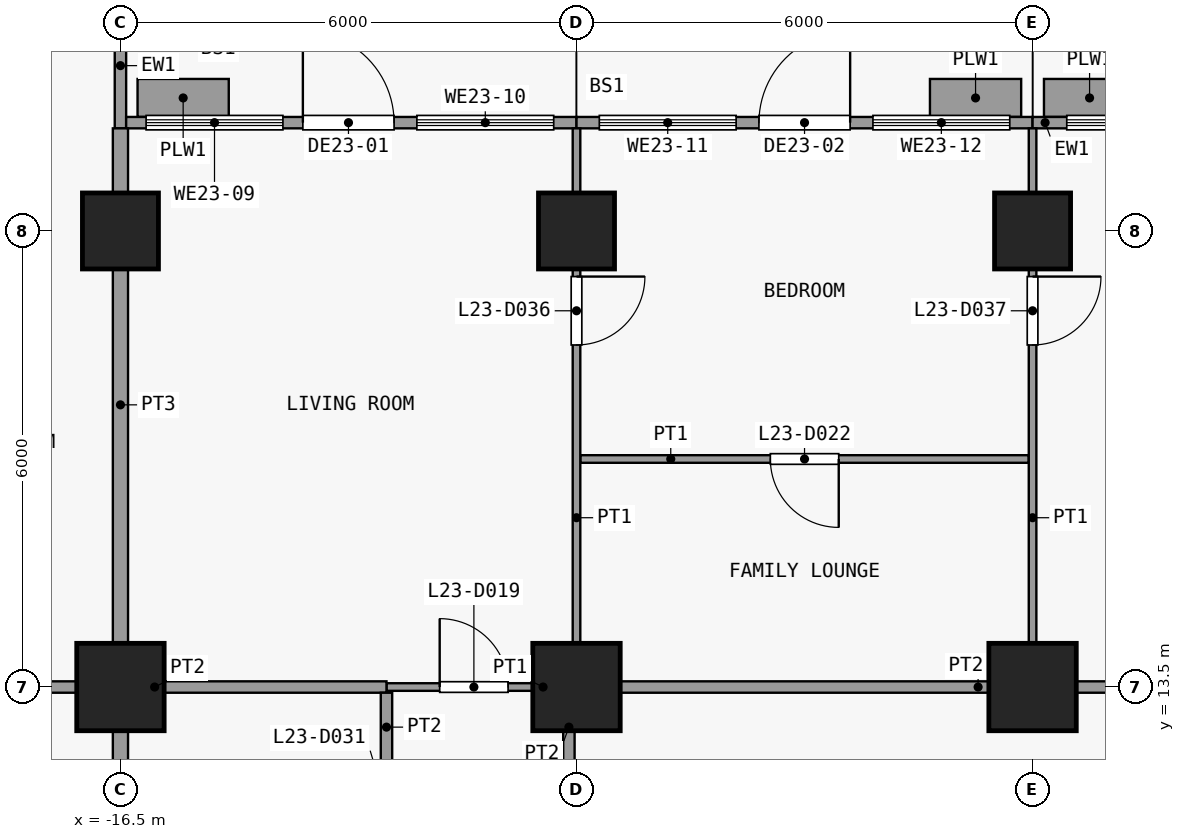
"""IFC4 building model, lengths in metres.
Left out: names, types, materials, properties, quantities, classifications, styles, units other than length and angle.
Written with IfcOpenShell. Run it as: python <this file> out.ifc"""

import sys

from ifc_helpers import new_model, si_unit, direction, frame, frame_2d, origin, origin_2d, place, context, subcontext, project, spatial, rectangle, extrude, element, fill, save


model = new_model("IFC4")
c1 = context("Model", 3, precision=1e-05, world=origin(), true_north=direction((0.0, 1.0)))
c2 = subcontext(c1, "Body", "Model", "MODEL_VIEW")
j1 = project(units=[si_unit("LENGTHUNIT", "METRE"), si_unit("PLANEANGLEUNIT", "RADIAN")], contexts=[c1])
p1 = place(None, origin())
s1 = spatial("IfcSite", under=j1, at=p1, CompositionType="ELEMENT")
p2 = place(p1, origin())
s2 = spatial("IfcBuilding", under=s1, at=p2, CompositionType="ELEMENT")
p3 = place(p2, frame((0.0, 0.0, 95.5)))
s3 = spatial("IfcBuildingStorey", under=s2, at=p3, CompositionType="ELEMENT", Elevation=95.5)
p4 = place(p3, frame((-16.5, 13.5, 0.0), z_axis=(0.0, 0.0, 1.0), x_axis=(1.0, 0.0, 0.0)))
e1 = element("IfcColumn", 1, at=p4, inside=s3, PredefinedType="COLUMN", context=c2, shape_type="SweptSolid", body=[
    extrude(rectangle(XDim=1.15, YDim=1.15, at=origin_2d()), origin(), (0.0, 0.0, 1.0), 3.6),
])
p5 = place(p3, frame((-16.5, 19.5, 0.0), z_axis=(0.0, 0.0, 1.0), x_axis=(1.0, 0.0, 0.0)))
e2 = element("IfcColumn", 2, at=p5, inside=s3, PredefinedType="COLUMN", context=c2, shape_type="SweptSolid", body=[
    extrude(rectangle(XDim=1.0, YDim=1.0, at=origin_2d()), origin(), (0.0, 0.0, 1.0), 3.6),
])
p6 = place(p3, frame((-10.5, 13.5, 0.0), z_axis=(0.0, 0.0, 1.0), x_axis=(1.0, 0.0, 0.0)))
e3 = element("IfcColumn", 3, at=p6, inside=s3, PredefinedType="COLUMN", context=c2, shape_type="SweptSolid", body=[
    extrude(rectangle(XDim=1.15, YDim=1.15, at=origin_2d()), origin(), (0.0, 0.0, 1.0), 3.6),
])
p7 = place(p3, frame((-10.5, 19.5, 0.0), z_axis=(0.0, 0.0, 1.0), x_axis=(1.0, 0.0, 0.0)))
e4 = element("IfcColumn", 4, at=p7, inside=s3, PredefinedType="COLUMN", context=c2, shape_type="SweptSolid", body=[
    extrude(rectangle(XDim=1.0, YDim=1.0, at=origin_2d()), origin(), (0.0, 0.0, 1.0), 3.6),
])
p8 = place(p3, frame((-4.5, 13.5, 0.0), z_axis=(0.0, 0.0, 1.0), x_axis=(1.0, 0.0, 0.0)))
e5 = element("IfcColumn", 5, at=p8, inside=s3, PredefinedType="COLUMN", context=c2, shape_type="SweptSolid", body=[
    extrude(rectangle(XDim=1.15, YDim=1.15, at=origin_2d()), origin(), (0.0, 0.0, 1.0), 3.6),
])
p9 = place(p3, frame((-4.5, 19.5, 0.0), z_axis=(0.0, 0.0, 1.0), x_axis=(1.0, 0.0, 0.0)))
e6 = element("IfcColumn", 6, at=p9, inside=s3, PredefinedType="COLUMN", context=c2, shape_type="SweptSolid", body=[
    extrude(rectangle(XDim=1.0, YDim=1.0, at=origin_2d()), origin(), (0.0, 0.0, 1.0), 3.6),
])
p10 = place(p3, frame((-16.5, 20.85, 0.0), z_axis=(0.0, 0.0, 1.0), x_axis=(0.0, 1.0, 0.0)))
e7 = element("IfcWall", 7, at=p10, inside=s3, PredefinedType="SOLIDWALL", context=c2, shape_type="SweptSolid", body=[
    extrude(rectangle(XDim=1.65, YDim=0.15, at=frame_2d((0.825, 0.0))), origin(), (0.0, 0.0, 1.0), 3.3),
])
p11 = place(p3, frame((-16.425, 20.925, 0.0), z_axis=(0.0, 0.0, 1.0), x_axis=(1.0, 0.0, 0.0)))
e8 = element("IfcWall", 8, at=p11, inside=s3, PredefinedType="SOLIDWALL", context=c2, shape_type="SweptSolid", body=[
    extrude(rectangle(XDim=5.925, YDim=0.15, at=frame_2d((2.962, 0.0))), origin(), (0.0, 0.0, 1.0), 3.3),
])
p12 = place(p11, frame((2.325, 0.0, 0.0)))
e9 = element("IfcOpeningElement", 9, at=p12, cuts=e8, PredefinedType="OPENING", context=c2, shape_type="SweptSolid", body=[
    extrude(rectangle(XDim=1.2, YDim=2.4, at=frame_2d((0.6, 1.2))), frame((0.0, 0.085, 0.0), z_axis=(0.0, -1.0, 0.0), x_axis=(1.0, 0.0, 0.0)), (0.0, 0.0, 1.0), 0.17),
])
p13 = place(p11, frame((0.262, 0.0, 0.9)))
e10 = element("IfcOpeningElement", 10, at=p13, cuts=e8, PredefinedType="OPENING", context=c2, shape_type="SweptSolid", body=[
    extrude(rectangle(XDim=1.8, YDim=2.1, at=frame_2d((0.9, 1.05))), frame((0.0, 0.085, 0.0), z_axis=(0.0, -1.0, 0.0), x_axis=(1.0, 0.0, 0.0)), (0.0, 0.0, 1.0), 0.17),
])
p14 = place(p11, frame((3.825, 0.0, 0.9)))
e11 = element("IfcOpeningElement", 11, at=p14, cuts=e8, PredefinedType="OPENING", context=c2, shape_type="SweptSolid", body=[
    extrude(rectangle(XDim=1.8, YDim=2.1, at=frame_2d((0.9, 1.05))), frame((0.0, 0.085, 0.0), z_axis=(0.0, -1.0, 0.0), x_axis=(1.0, 0.0, 0.0)), (0.0, 0.0, 1.0), 0.17),
])
p15 = place(p3, frame((-16.275, 21.25, 0.0), z_axis=(0.0, 0.0, 1.0), x_axis=(1.0, 0.0, 0.0)))
e12 = element("IfcWall", 12, at=p15, inside=s3, PredefinedType="USERDEFINED", context=c2, shape_type="SweptSolid", body=[
    extrude(rectangle(XDim=1.2, YDim=0.5, at=frame_2d((0.6, 0.0))), origin(), (0.0, 0.0, 1.0), 0.9),
])
p16 = place(p3, frame((-10.5, 20.925, 0.0), z_axis=(0.0, 0.0, 1.0), x_axis=(1.0, 0.0, 0.0)))
e13 = element("IfcWall", 13, at=p16, inside=s3, PredefinedType="SOLIDWALL", context=c2, shape_type="SweptSolid", body=[
    extrude(rectangle(XDim=6.0, YDim=0.15, at=frame_2d((3.0, 0.0))), origin(), (0.0, 0.0, 1.0), 3.3),
])
p17 = place(p16, frame((2.4, 0.0, 0.0)))
e14 = element("IfcOpeningElement", 14, at=p17, cuts=e13, PredefinedType="OPENING", context=c2, shape_type="SweptSolid", body=[
    extrude(rectangle(XDim=1.2, YDim=2.4, at=frame_2d((0.6, 1.2))), frame((0.0, 0.085, 0.0), z_axis=(0.0, -1.0, 0.0), x_axis=(1.0, 0.0, 0.0)), (0.0, 0.0, 1.0), 0.17),
])
p18 = place(p16, frame((0.3, 0.0, 0.9)))
e15 = element("IfcOpeningElement", 15, at=p18, cuts=e13, PredefinedType="OPENING", context=c2, shape_type="SweptSolid", body=[
    extrude(rectangle(XDim=1.8, YDim=2.1, at=frame_2d((0.9, 1.05))), frame((0.0, 0.085, 0.0), z_axis=(0.0, -1.0, 0.0), x_axis=(1.0, 0.0, 0.0)), (0.0, 0.0, 1.0), 0.17),
])
p19 = place(p16, frame((3.9, 0.0, 0.9)))
e16 = element("IfcOpeningElement", 16, at=p19, cuts=e13, PredefinedType="OPENING", context=c2, shape_type="SweptSolid", body=[
    extrude(rectangle(XDim=1.8, YDim=2.1, at=frame_2d((0.9, 1.05))), frame((0.0, 0.085, 0.0), z_axis=(0.0, -1.0, 0.0), x_axis=(1.0, 0.0, 0.0)), (0.0, 0.0, 1.0), 0.17),
])
p20 = place(p3, frame((-5.85, 21.25, 0.0), z_axis=(0.0, 0.0, 1.0), x_axis=(1.0, 0.0, 0.0)))
e17 = element("IfcWall", 17, at=p20, inside=s3, PredefinedType="USERDEFINED", context=c2, shape_type="SweptSolid", body=[
    extrude(rectangle(XDim=1.2, YDim=0.5, at=frame_2d((0.6, 0.0))), origin(), (0.0, 0.0, 1.0), 0.9),
])
p21 = place(p3, frame((-4.5, 20.925, 0.0), z_axis=(0.0, 0.0, 1.0), x_axis=(1.0, 0.0, 0.0)))
e18 = element("IfcWall", 18, at=p21, inside=s3, PredefinedType="SOLIDWALL", context=c2, shape_type="SweptSolid", body=[
    extrude(rectangle(XDim=8.925, YDim=0.15, at=frame_2d((4.462, 0.0))), origin(), (0.0, 0.0, 1.0), 3.3),
])
p22 = place(p21, frame((3.9, 0.0, 0.0)))
e19 = element("IfcOpeningElement", 19, at=p22, cuts=e18, PredefinedType="OPENING", context=c2, shape_type="SweptSolid", body=[
    extrude(rectangle(XDim=1.2, YDim=2.4, at=frame_2d((0.6, 1.2))), frame((0.0, 0.085, 0.0), z_axis=(0.0, -1.0, 0.0), x_axis=(1.0, 0.0, 0.0)), (0.0, 0.0, 1.0), 0.17),
])
p23 = place(p21, frame((0.45, 0.0, 0.9)))
e20 = element("IfcOpeningElement", 20, at=p23, cuts=e18, PredefinedType="OPENING", context=c2, shape_type="SweptSolid", body=[
    extrude(rectangle(XDim=3.0, YDim=2.1, at=frame_2d((1.5, 1.05))), frame((0.0, 0.085, 0.0), z_axis=(0.0, -1.0, 0.0), x_axis=(1.0, 0.0, 0.0)), (0.0, 0.0, 1.0), 0.17),
])
p24 = place(p21, frame((5.512, 0.0, 0.9)))
e21 = element("IfcOpeningElement", 21, at=p24, cuts=e18, PredefinedType="OPENING", context=c2, shape_type="SweptSolid", body=[
    extrude(rectangle(XDim=3.0, YDim=2.1, at=frame_2d((1.5, 1.05))), frame((0.0, 0.085, 0.0), z_axis=(0.0, -1.0, 0.0), x_axis=(1.0, 0.0, 0.0)), (0.0, 0.0, 1.0), 0.17),
])
p25 = place(p3, frame((-4.35, 21.25, 0.0), z_axis=(0.0, 0.0, 1.0), x_axis=(1.0, 0.0, 0.0)))
e22 = element("IfcWall", 22, at=p25, inside=s3, PredefinedType="USERDEFINED", context=c2, shape_type="SweptSolid", body=[
    extrude(rectangle(XDim=1.2, YDim=0.5, at=frame_2d((0.6, 0.0))), origin(), (0.0, 0.0, 1.0), 0.9),
])
p26 = place(p3, frame((-13.0, 13.5, 0.0), z_axis=(0.0, 0.0, 1.0), x_axis=(1.0, 0.0, 0.0)))
e23 = element("IfcWall", 23, at=p26, inside=s3, PredefinedType="PARTITIONING", context=c2, shape_type="SweptSolid", body=[
    extrude(rectangle(XDim=2.4, YDim=0.1, at=frame_2d((1.2, 0.0))), origin(), (0.0, 0.0, 1.0), 3.3),
])
p27 = place(p26, frame((0.7, 0.0, 0.0)))
e24 = element("IfcOpeningElement", 24, at=p27, cuts=e23, PredefinedType="OPENING", context=c2, shape_type="SweptSolid", body=[
    extrude(rectangle(XDim=0.9, YDim=2.1, at=frame_2d((0.45, 1.05))), frame((0.0, 0.06, 0.0), z_axis=(0.0, -1.0, 0.0), x_axis=(1.0, 0.0, 0.0)), (0.0, 0.0, 1.0), 0.12),
])
p28 = place(p3, frame((-19.1, 13.5, 0.0), z_axis=(0.0, 0.0, 1.0), x_axis=(1.0, 0.0, 0.0)))
e25 = element("IfcWall", 25, at=p28, inside=s3, PredefinedType="PARTITIONING", context=c2, shape_type="SweptSolid", body=[
    extrude(rectangle(XDim=6.1, YDim=0.15, at=frame_2d((3.05, 0.0))), origin(), (0.0, 0.0, 1.0), 3.3),
])
p29 = place(p3, frame((-10.5, 13.5, 0.0), z_axis=(0.0, 0.0, 1.0), x_axis=(1.0, 0.0, 0.0)))
e26 = element("IfcWall", 26, at=p29, inside=s3, PredefinedType="PARTITIONING", context=c2, shape_type="SweptSolid", body=[
    extrude(rectangle(XDim=10.567, YDim=0.15, at=frame_2d((5.283, 0.0))), origin(), (0.0, 0.0, 1.0), 3.3),
])
p30 = place(p3, frame((-10.45, 16.5, 0.0), z_axis=(0.0, 0.0, 1.0), x_axis=(1.0, 0.0, 0.0)))
e27 = element("IfcWall", 27, at=p30, inside=s3, PredefinedType="PARTITIONING", context=c2, shape_type="SweptSolid", body=[
    extrude(rectangle(XDim=5.9, YDim=0.1, at=frame_2d((2.95, 0.0))), origin(), (0.0, 0.0, 1.0), 3.3),
])
p31 = place(p30, frame((2.5, 0.0, 0.0)))
e28 = element("IfcOpeningElement", 28, at=p31, cuts=e27, PredefinedType="OPENING", context=c2, shape_type="SweptSolid", body=[
    extrude(rectangle(XDim=0.9, YDim=2.1, at=frame_2d((0.45, 1.05))), frame((0.0, 0.06, 0.0), z_axis=(0.0, -1.0, 0.0), x_axis=(1.0, 0.0, 0.0)), (0.0, 0.0, 1.0), 0.12),
])
p32 = place(p3, frame((-16.5, 10.6, 0.0), z_axis=(0.0, 0.0, 1.0), x_axis=(0.0, 1.0, 0.0)))
e29 = element("IfcWall", 29, at=p32, inside=s3, PredefinedType="PARTITIONING", context=c2, shape_type="SweptSolid", body=[
    extrude(rectangle(XDim=2.825, YDim=0.2, at=frame_2d((1.413, 0.0))), origin(), (0.0, 0.0, 1.0), 3.3),
])
p33 = place(p3, frame((-16.5, 13.575, 0.0), z_axis=(0.0, 0.0, 1.0), x_axis=(0.0, 1.0, 0.0)))
e30 = element("IfcWall", 30, at=p33, inside=s3, PredefinedType="PARTITIONING", context=c2, shape_type="SweptSolid", body=[
    extrude(rectangle(XDim=7.275, YDim=0.2, at=frame_2d((3.638, 0.0))), origin(), (0.0, 0.0, 1.0), 3.3),
])
p34 = place(p3, frame((-13.0, 10.6, 0.0), z_axis=(0.0, 0.0, 1.0), x_axis=(0.0, 1.0, 0.0)))
e31 = element("IfcWall", 31, at=p34, inside=s3, PredefinedType="PARTITIONING", context=c2, shape_type="SweptSolid", body=[
    extrude(rectangle(XDim=2.825, YDim=0.15, at=frame_2d((1.413, 0.0))), origin(), (0.0, 0.0, 1.0), 3.3),
])
p35 = place(p34, frame((0.9, 0.0, 0.0)))
e32 = element("IfcOpeningElement", 32, at=p35, cuts=e31, PredefinedType="OPENING", context=c2, shape_type="SweptSolid", body=[
    extrude(rectangle(XDim=0.9, YDim=2.1, at=frame_2d((0.45, 1.05))), frame((0.0, 0.085, 0.0), z_axis=(0.0, -1.0, 0.0), x_axis=(1.0, 0.0, 0.0)), (0.0, 0.0, 1.0), 0.17),
])
p36 = place(p3, frame((-10.6, 10.6, 0.0), z_axis=(0.0, 0.0, 1.0), x_axis=(0.0, 1.0, 0.0)))
e33 = element("IfcWall", 33, at=p36, inside=s3, PredefinedType="PARTITIONING", context=c2, shape_type="SweptSolid", body=[
    extrude(rectangle(XDim=2.825, YDim=0.15, at=frame_2d((1.413, 0.0))), origin(), (0.0, 0.0, 1.0), 3.3),
])
p37 = place(p36, frame((0.9, 0.0, 0.0)))
e34 = element("IfcOpeningElement", 34, at=p37, cuts=e33, PredefinedType="OPENING", context=c2, shape_type="SweptSolid", body=[
    extrude(rectangle(XDim=0.9, YDim=2.1, at=frame_2d((0.45, 1.05))), frame((0.0, 0.085, 0.0), z_axis=(0.0, -1.0, 0.0), x_axis=(1.0, 0.0, 0.0)), (0.0, 0.0, 1.0), 0.17),
])
p38 = place(p3, frame((-10.5, 13.575, 0.0), z_axis=(0.0, 0.0, 1.0), x_axis=(0.0, 1.0, 0.0)))
e35 = element("IfcWall", 35, at=p38, inside=s3, PredefinedType="PARTITIONING", context=c2, shape_type="SweptSolid", body=[
    extrude(rectangle(XDim=7.275, YDim=0.1, at=frame_2d((3.638, 0.0))), origin(), (0.0, 0.0, 1.0), 3.3),
])
p39 = place(p38, frame((4.425, 0.0, 0.0)))
e36 = element("IfcOpeningElement", 36, at=p39, cuts=e35, PredefinedType="OPENING", context=c2, shape_type="SweptSolid", body=[
    extrude(rectangle(XDim=0.9, YDim=2.1, at=frame_2d((0.45, 1.05))), frame((0.0, 0.06, 0.0), z_axis=(0.0, -1.0, 0.0), x_axis=(1.0, 0.0, 0.0)), (0.0, 0.0, 1.0), 0.12),
])
p40 = place(p3, frame((-4.5, 13.575, 0.0), z_axis=(0.0, 0.0, 1.0), x_axis=(0.0, 1.0, 0.0)))
e37 = element("IfcWall", 37, at=p40, inside=s3, PredefinedType="PARTITIONING", context=c2, shape_type="SweptSolid", body=[
    extrude(rectangle(XDim=7.275, YDim=0.1, at=frame_2d((3.638, 0.0))), origin(), (0.0, 0.0, 1.0), 3.3),
])
p41 = place(p40, frame((4.425, 0.0, 0.0)))
e38 = element("IfcOpeningElement", 38, at=p41, cuts=e37, PredefinedType="OPENING", context=c2, shape_type="SweptSolid", body=[
    extrude(rectangle(XDim=0.9, YDim=2.1, at=frame_2d((0.45, 1.05))), frame((0.0, 0.06, 0.0), z_axis=(0.0, -1.0, 0.0), x_axis=(1.0, 0.0, 0.0)), (0.0, 0.0, 1.0), 0.12),
])
p42 = place(p12, origin())
e39 = element("IfcDoor", 39, at=p42, inside=s3, OperationType="SINGLE_SWING_LEFT", PredefinedType="DOOR", context=c2, shape_type="SweptSolid", body=[
    extrude(rectangle(XDim=1.2, YDim=2.4, at=frame_2d((0.6, 1.2))), frame((0.0, 0.025, 0.0), z_axis=(0.0, -1.0, 0.0), x_axis=(1.0, 0.0, 0.0)), (0.0, 0.0, 1.0), 0.05),
])
fill(e9, e39)
p43 = place(p13, origin())
e40 = element("IfcWindow", 40, at=p43, inside=s3, PartitioningType="SINGLE_PANEL", PredefinedType="WINDOW", context=c2, shape_type="SweptSolid", body=[
    extrude(rectangle(XDim=1.8, YDim=2.1, at=frame_2d((0.9, 1.05))), frame((0.0, 0.03, 0.0), z_axis=(0.0, -1.0, 0.0), x_axis=(1.0, 0.0, 0.0)), (0.0, 0.0, 1.0), 0.06),
])
fill(e10, e40)
p44 = place(p14, origin())
e41 = element("IfcWindow", 41, at=p44, inside=s3, PartitioningType="SINGLE_PANEL", PredefinedType="WINDOW", context=c2, shape_type="SweptSolid", body=[
    extrude(rectangle(XDim=1.8, YDim=2.1, at=frame_2d((0.9, 1.05))), frame((0.0, 0.03, 0.0), z_axis=(0.0, -1.0, 0.0), x_axis=(1.0, 0.0, 0.0)), (0.0, 0.0, 1.0), 0.06),
])
fill(e11, e41)
p45 = place(p17, origin())
e42 = element("IfcDoor", 42, at=p45, inside=s3, OperationType="SINGLE_SWING_RIGHT", PredefinedType="DOOR", context=c2, shape_type="SweptSolid", body=[
    extrude(rectangle(XDim=1.2, YDim=2.4, at=frame_2d((0.6, 1.2))), frame((0.0, 0.025, 0.0), z_axis=(0.0, -1.0, 0.0), x_axis=(1.0, 0.0, 0.0)), (0.0, 0.0, 1.0), 0.05),
])
fill(e14, e42)
p46 = place(p18, origin())
e43 = element("IfcWindow", 43, at=p46, inside=s3, PartitioningType="SINGLE_PANEL", PredefinedType="WINDOW", context=c2, shape_type="SweptSolid", body=[
    extrude(rectangle(XDim=1.8, YDim=2.1, at=frame_2d((0.9, 1.05))), frame((0.0, 0.03, 0.0), z_axis=(0.0, -1.0, 0.0), x_axis=(1.0, 0.0, 0.0)), (0.0, 0.0, 1.0), 0.06),
])
fill(e15, e43)
p47 = place(p19, origin())
e44 = element("IfcWindow", 44, at=p47, inside=s3, PartitioningType="SINGLE_PANEL", PredefinedType="WINDOW", context=c2, shape_type="SweptSolid", body=[
    extrude(rectangle(XDim=1.8, YDim=2.1, at=frame_2d((0.9, 1.05))), frame((0.0, 0.03, 0.0), z_axis=(0.0, -1.0, 0.0), x_axis=(1.0, 0.0, 0.0)), (0.0, 0.0, 1.0), 0.06),
])
fill(e16, e44)
p48 = place(p23, origin())
e45 = element("IfcWindow", 45, at=p48, inside=s3, PartitioningType="SINGLE_PANEL", PredefinedType="WINDOW", context=c2, shape_type="SweptSolid", body=[
    extrude(rectangle(XDim=3.0, YDim=2.1, at=frame_2d((1.5, 1.05))), frame((0.0, 0.03, 0.0), z_axis=(0.0, -1.0, 0.0), x_axis=(1.0, 0.0, 0.0)), (0.0, 0.0, 1.0), 0.06),
])
fill(e20, e45)
p49 = place(p27, origin())
e46 = element("IfcDoor", 46, at=p49, inside=s3, OperationType="SINGLE_SWING_RIGHT", PredefinedType="DOOR", context=c2, shape_type="SweptSolid", body=[
    extrude(rectangle(XDim=0.9, YDim=2.1, at=frame_2d((0.45, 1.05))), frame((0.0, 0.025, 0.0), z_axis=(0.0, -1.0, 0.0), x_axis=(1.0, 0.0, 0.0)), (0.0, 0.0, 1.0), 0.05),
])
fill(e24, e46)
p50 = place(p31, origin())
e47 = element("IfcDoor", 47, at=p50, inside=s3, OperationType="SINGLE_SWING_RIGHT", PredefinedType="DOOR", context=c2, shape_type="SweptSolid", body=[
    extrude(rectangle(XDim=0.9, YDim=2.1, at=frame_2d((0.45, 1.05))), frame((0.0, 0.025, 0.0), z_axis=(0.0, -1.0, 0.0), x_axis=(1.0, 0.0, 0.0)), (0.0, 0.0, 1.0), 0.05),
])
fill(e28, e47)
p51 = place(p39, origin())
e48 = element("IfcDoor", 48, at=p51, inside=s3, OperationType="SINGLE_SWING_RIGHT", PredefinedType="DOOR", context=c2, shape_type="SweptSolid", body=[
    extrude(rectangle(XDim=0.9, YDim=2.1, at=frame_2d((0.45, 1.05))), frame((0.0, 0.025, 0.0), z_axis=(0.0, -1.0, 0.0), x_axis=(1.0, 0.0, 0.0)), (0.0, 0.0, 1.0), 0.05),
])
fill(e36, e48)
p52 = place(p41, origin())
e49 = element("IfcDoor", 49, at=p52, inside=s3, OperationType="SINGLE_SWING_RIGHT", PredefinedType="DOOR", context=c2, shape_type="SweptSolid", body=[
    extrude(rectangle(XDim=0.9, YDim=2.1, at=frame_2d((0.45, 1.05))), frame((0.0, 0.025, 0.0), z_axis=(0.0, -1.0, 0.0), x_axis=(1.0, 0.0, 0.0)), (0.0, 0.0, 1.0), 0.05),
])
fill(e38, e49)
save(model, sys.argv[1])
